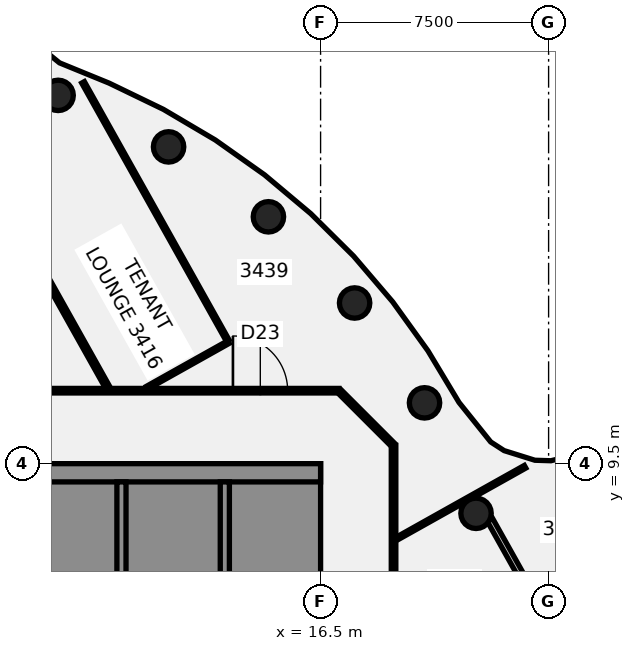
"""IFC4 building model, lengths in metres.
Left out: names, types, materials, properties, quantities, classifications, styles, units other than length and angle.
Written with IfcOpenShell. Run it as: python <this file> out.ifc"""

import sys

from ifc_helpers import new_model, si_unit, direction, frame, frame_2d, origin, origin_2d, place, context, subcontext, project, spatial, polyline, rectangle, circle, outline, extrude, element, fill, save


model = new_model("IFC4")
c1 = context("Model", 3, precision=1e-05, world=origin(), true_north=direction((0.0, 1.0)))
c2 = subcontext(c1, "Body", "Model", "MODEL_VIEW")
j1 = project(units=[si_unit("LENGTHUNIT", "METRE"), si_unit("PLANEANGLEUNIT", "RADIAN")], contexts=[c1])
p1 = place(None, origin())
s1 = spatial("IfcSite", under=j1, at=p1, CompositionType="ELEMENT")
p2 = place(p1, origin())
s2 = spatial("IfcBuilding", under=s1, at=p2, CompositionType="ELEMENT")
p3 = place(p2, frame((0.0, 0.0, 140.5)))
s3 = spatial("IfcBuildingStorey", under=s2, at=p3, CompositionType="ELEMENT", Elevation=140.5)
for number, where, z_axis, x_axis in (
    (1, (21.613, 7.866, -0.14), (0.0, 0.0, 1.0), (1.0, 0.0, 0.0)),
    (2, (19.919, 11.5, -0.14), (0.0, 0.0, 1.0), (1.0, 0.0, 0.0)),
    (3, (17.619, 14.784, -0.14), (0.0, 0.0, 1.0), (1.0, 0.0, 0.0)),
    (4, (14.784, 17.619, -0.14), (0.0, 0.0, 1.0), (1.0, 0.0, 0.0)),
    (5, (11.5, 19.919, -0.14), (0.0, 0.0, 1.0), (1.0, 0.0, 0.0)),
    (6, (7.866, 21.613, -0.14), (0.0, 0.0, 1.0), (1.0, 0.0, 0.0)),
):
    element("IfcColumn", number, at=place(p3, frame(where, z_axis=z_axis, x_axis=x_axis)), inside=s3, PredefinedType="COLUMN", context=c2, shape_type="SweptSolid", body=[
        extrude(circle(Radius=0.5, at=origin_2d()), origin(), (0.0, 0.0, 1.0), 3.75),
    ])
p4 = place(p3, frame((3.787, 22.196, 0.0), z_axis=(0.0, 0.0, 1.0), x_axis=(0.488718412152, -0.872441581783, 0.0)))
e7 = element("IfcWall", 7, at=p4, inside=s3, PredefinedType="PARTITIONING", context=c2, shape_type="SweptSolid", body=[
    extrude(rectangle(XDim=11.696, YDim=0.15, at=frame_2d((5.848, 0.0))), origin(), (0.0, 0.0, 1.0), 3.01),
])
p5 = place(p4, frame((3.6, 0.0, 0.0)))
e8 = element("IfcOpeningElement", 8, at=p5, cuts=e7, PredefinedType="OPENING", context=c2, shape_type="SweptSolid", body=[
    extrude(rectangle(XDim=1.8, YDim=2.1, at=frame_2d((0.9, 1.05))), frame((0.0, 0.085, 0.0), z_axis=(0.0, -1.0, 0.0), x_axis=(1.0, 0.0, 0.0)), (0.0, 0.0, 1.0), 0.17),
])
p6 = place(p3, frame((8.687, 22.042, 0.0), z_axis=(0.0, 0.0, 1.0), x_axis=(0.488719378488, -0.872441040467, 0.0)))
e9 = element("IfcWall", 9, at=p6, inside=s3, PredefinedType="PARTITIONING", context=c2, shape_type="SweptSolid", body=[
    extrude(rectangle(XDim=9.74, YDim=0.1, at=frame_2d((4.87, 0.0))), origin(), (0.0, 0.0, 1.0), 3.01),
])
p7 = place(p3, frame((22.067, 7.656, 0.0), z_axis=(0.0, 0.0, 1.0), x_axis=(0.488719781304, -0.872440814819, 0.0)))
e10 = element("IfcWall", 10, at=p7, inside=s3, PredefinedType="PARTITIONING", context=c2, shape_type="SweptSolid", body=[
    extrude(rectangle(XDim=13.346, YDim=0.2, at=frame_2d((6.673, 0.0))), origin(), (0.0, 0.0, 1.0), 3.01),
])
p8 = place(p7, frame((6.048, 0.0, 0.0)))
e11 = element("IfcOpeningElement", 11, at=p8, cuts=e10, PredefinedType="OPENING", context=c2, shape_type="SweptSolid", body=[
    extrude(rectangle(XDim=1.4, YDim=2.1, at=frame_2d((0.7, 1.05))), frame((0.0, 0.11, 0.0), z_axis=(0.0, -1.0, 0.0), x_axis=(1.0, 0.0, 0.0)), (0.0, 0.0, 1.0), 0.22),
])
p9 = place(p3, frame((17.128, 11.872, 0.0), z_axis=(0.0, 0.0, 1.0), x_axis=(0.707106781187, -0.707106781187, 0.0)))
e12 = element("IfcWall", 12, at=p9, inside=s3, PredefinedType="PARTITIONING", context=c2, shape_type="SweptSolid", body=[
    extrude(rectangle(XDim=2.465, YDim=0.15, at=frame_2d((1.232, 0.0))), origin(), (0.0, 0.0, 1.0), 3.01),
])
p10 = place(p3, frame((-17.065, 11.9, 0.0), z_axis=(0.0, 0.0, 1.0), x_axis=(1.0, 0.0, 0.0)))
e13 = element("IfcWall", 13, at=p10, inside=s3, PredefinedType="PARTITIONING", context=c2, shape_type="SweptSolid", body=[
    extrude(rectangle(XDim=34.165, YDim=0.15, at=frame_2d((17.083, 0.0))), origin(), (0.0, 0.0, 1.0), 3.01),
])
p11 = place(p10, frame((21.825, 0.0, 0.0)))
e14 = element("IfcOpeningElement", 14, at=p11, cuts=e13, PredefinedType="OPENING", context=c2, shape_type="SweptSolid", body=[
    extrude(rectangle(XDim=1.8, YDim=2.1, at=frame_2d((0.9, 1.05))), frame((0.0, 0.085, 0.0), z_axis=(0.0, -1.0, 0.0), x_axis=(1.0, 0.0, 0.0)), (0.0, 0.0, 1.0), 0.17),
])
p12 = place(p10, frame((30.682, 0.0, 0.0)))
e15 = element("IfcOpeningElement", 15, at=p12, cuts=e13, PredefinedType="OPENING", context=c2, shape_type="SweptSolid", body=[
    extrude(rectangle(XDim=1.8, YDim=2.1, at=frame_2d((0.9, 1.05))), frame((0.0, 0.085, 0.0), z_axis=(0.0, -1.0, 0.0), x_axis=(1.0, 0.0, 0.0)), (0.0, 0.0, 1.0), 0.17),
])
p13 = place(p10, frame((6.115, 0.0, 0.0)))
e16 = element("IfcOpeningElement", 16, at=p13, cuts=e13, PredefinedType="OPENING", context=c2, shape_type="SweptSolid", body=[
    extrude(rectangle(XDim=1.8, YDim=2.1, at=frame_2d((0.9, 1.05))), frame((0.0, 0.085, 0.0), z_axis=(0.0, -1.0, 0.0), x_axis=(1.0, 0.0, 0.0)), (0.0, 0.0, 1.0), 0.17),
])
p14 = place(p3, frame((10.796, 12.0, 0.0), z_axis=(0.0, 0.0, 1.0), x_axis=(0.872341753977, 0.488896578294, 0.0)))
e17 = element("IfcWall", 17, at=p14, inside=s3, PredefinedType="PARTITIONING", context=c2, shape_type="SweptSolid", body=[
    extrude(rectangle(XDim=3.068, YDim=0.1, at=frame_2d((1.534, 0.0))), origin(), (0.0, 0.0, 1.0), 3.01),
])
p15 = place(p3, frame((18.983, 7.021, 0.0), z_axis=(0.0, 0.0, 1.0), x_axis=(0.872449517154, 0.488704245959, 0.0)))
e18 = element("IfcWall", 18, at=p15, inside=s3, PredefinedType="PARTITIONING", context=c2, shape_type="SweptSolid", body=[
    extrude(rectangle(XDim=4.864, YDim=0.1, at=frame_2d((2.432, 0.0))), origin(), (0.0, 0.0, 1.0), 3.01),
])
p16 = place(p3, frame((18.9, -10.1, 0.0), z_axis=(0.0, 0.0, 1.0), x_axis=(0.0, 1.0, 0.0)))
e19 = element("IfcWall", 19, at=p16, inside=s3, PredefinedType="PARTITIONING", context=c2, shape_type="SweptSolid", body=[
    extrude(rectangle(XDim=20.2, YDim=0.15, at=frame_2d((10.1, 0.0))), origin(), (0.0, 0.0, 1.0), 3.01),
])
p17 = place(p16, frame((8.367, 0.0, 0.0)))
e20 = element("IfcOpeningElement", 20, at=p17, cuts=e19, PredefinedType="OPENING", context=c2, shape_type="SweptSolid", body=[
    extrude(rectangle(XDim=1.8, YDim=2.1, at=frame_2d((0.9, 1.05))), frame((0.0, 0.085, 0.0), z_axis=(0.0, -1.0, 0.0), x_axis=(1.0, 0.0, 0.0)), (0.0, 0.0, 1.0), 0.17),
])
p18 = place(p16, frame((13.611, 0.0, 0.0)))
e21 = element("IfcOpeningElement", 21, at=p18, cuts=e19, PredefinedType="OPENING", context=c2, shape_type="SweptSolid", body=[
    extrude(rectangle(XDim=0.9, YDim=2.1, at=frame_2d((0.45, 1.05))), frame((0.0, 0.085, 0.0), z_axis=(0.0, -1.0, 0.0), x_axis=(1.0, 0.0, 0.0)), (0.0, 0.0, 1.0), 0.17),
])
p19 = place(p3, origin())
e22 = element("IfcWall", 22, at=p19, inside=s3, PredefinedType="SHEAR", context=c2, shape_type="SweptSolid", body=[
    extrude(outline(polyline([(13.5, -8.125), (13.5, -8.9), (15.9, -8.9), (16.5, -8.9), (16.5, 8.9), (15.9, 8.9), (13.5, 8.9), (13.5, 8.125), (15.9, 8.125), (15.9, 5.625), (13.5, 5.625), (13.5, 5.375), (15.9, 5.375), (15.9, -5.375), (13.5, -5.375), (13.5, -5.625), (15.9, -5.625), (15.9, -8.125), (13.5, -8.125)])), origin(), (0.0, 0.0, 1.0), 3.61),
])
p20 = place(p3, frame((16.5, 9.2, 0.0), z_axis=(0.0, 0.0, 1.0), x_axis=(-1.0, 0.0, 0.0)))
e23 = element("IfcWall", 23, at=p20, inside=s3, PredefinedType="SHEAR", context=c2, shape_type="SweptSolid", body=[
    extrude(rectangle(XDim=13.0, YDim=0.6, at=frame_2d((6.5, 0.0))), origin(), (0.0, 0.0, 1.0), 3.61),
])
p21 = place(p3, origin())
e24 = element("IfcWall", 24, at=p21, inside=s3, PredefinedType="SHEAR", context=c2, shape_type="SweptSolid", body=[
    extrude(outline(polyline([(9.8, -5.375), (7.5, -5.375), (7.5, -2.875), (9.8, -2.875), (9.8, -2.625), (7.5, -2.625), (7.5, -0.125), (9.8, -0.125), (9.8, 0.125), (7.5, 0.125), (7.5, 2.625), (9.8, 2.625), (9.8, 2.875), (7.5, 2.875), (7.5, 5.375), (9.8, 5.375), (9.8, 5.625), (7.5, 5.625), (7.5, 8.125), (9.8, 8.125), (9.8, 8.9), (7.5, 8.9), (7.2, 8.9), (7.2, -5.625), (7.5, -5.625), (9.8, -5.625), (9.8, -5.375)])), origin(), (0.0, 0.0, 1.0), 3.61),
])
p22 = place(p3, frame((13.35, -8.9, 0.0), z_axis=(0.0, 0.0, 1.0), x_axis=(0.0, 1.0, 0.0)))
e25 = element("IfcWall", 25, at=p22, inside=s3, PredefinedType="SHEAR", context=c2, shape_type="SweptSolid", body=[
    extrude(rectangle(XDim=17.8, YDim=0.3, at=frame_2d((8.9, 0.0))), origin(), (0.0, 0.0, 1.0), 3.61),
])
p23 = place(p22, frame((1.325, 0.0, 0.0)))
e26 = element("IfcOpeningElement", 26, at=p23, cuts=e25, PredefinedType="OPENING", context=c2, shape_type="SweptSolid", body=[
    extrude(rectangle(XDim=1.4, YDim=2.1, at=frame_2d((0.7, 1.05))), frame((0.0, 0.16, 0.0), z_axis=(0.0, -1.0, 0.0), x_axis=(1.0, 0.0, 0.0)), (0.0, 0.0, 1.0), 0.32),
])
p24 = place(p22, frame((6.546, 0.0, 0.0)))
e27 = element("IfcOpeningElement", 27, at=p24, cuts=e25, PredefinedType="OPENING", context=c2, shape_type="SweptSolid", body=[
    extrude(rectangle(XDim=1.0, YDim=2.1, at=frame_2d((0.5, 1.05))), frame((0.0, 0.16, 0.0), z_axis=(0.0, -1.0, 0.0), x_axis=(1.0, 0.0, 0.0)), (0.0, 0.0, 1.0), 0.32),
])
p25 = place(p22, frame((12.046, 0.0, 0.0)))
e28 = element("IfcOpeningElement", 28, at=p25, cuts=e25, PredefinedType="OPENING", context=c2, shape_type="SweptSolid", body=[
    extrude(rectangle(XDim=1.0, YDim=2.1, at=frame_2d((0.5, 1.05))), frame((0.0, 0.16, 0.0), z_axis=(0.0, -1.0, 0.0), x_axis=(1.0, 0.0, 0.0)), (0.0, 0.0, 1.0), 0.32),
])
p26 = place(p3, frame((9.95, -8.9, 0.0), z_axis=(0.0, 0.0, 1.0), x_axis=(0.0, 1.0, 0.0)))
e29 = element("IfcWall", 29, at=p26, inside=s3, PredefinedType="SHEAR", context=c2, shape_type="SweptSolid", body=[
    extrude(rectangle(XDim=17.8, YDim=0.3, at=frame_2d((8.9, 0.0))), origin(), (0.0, 0.0, 1.0), 3.61),
])
p27 = place(p26, frame((4.175, 0.0, 0.0)))
e30 = element("IfcOpeningElement", 30, at=p27, cuts=e29, PredefinedType="OPENING", context=c2, shape_type="SweptSolid", body=[
    extrude(rectangle(XDim=1.2, YDim=2.1, at=frame_2d((0.6, 1.05))), frame((0.0, 0.16, 0.0), z_axis=(0.0, -1.0, 0.0), x_axis=(1.0, 0.0, 0.0)), (0.0, 0.0, 1.0), 0.32),
])
p28 = place(p26, frame((6.925, 0.0, 0.0)))
e31 = element("IfcOpeningElement", 31, at=p28, cuts=e29, PredefinedType="OPENING", context=c2, shape_type="SweptSolid", body=[
    extrude(rectangle(XDim=1.2, YDim=2.1, at=frame_2d((0.6, 1.05))), frame((0.0, 0.16, 0.0), z_axis=(0.0, -1.0, 0.0), x_axis=(1.0, 0.0, 0.0)), (0.0, 0.0, 1.0), 0.32),
])
p29 = place(p12, origin())
e32 = element("IfcDoor", 32, at=p29, inside=s3, OperationType="DOUBLE_DOOR_SINGLE_SWING", PredefinedType="DOOR", context=c2, shape_type="SweptSolid", body=[
    extrude(rectangle(XDim=1.8, YDim=2.1, at=frame_2d((0.9, 1.05))), frame((0.0, 0.025, 0.0), z_axis=(0.0, -1.0, 0.0), x_axis=(1.0, 0.0, 0.0)), (0.0, 0.0, 1.0), 0.05),
])
fill(e15, e32)
save(model, sys.argv[1])
